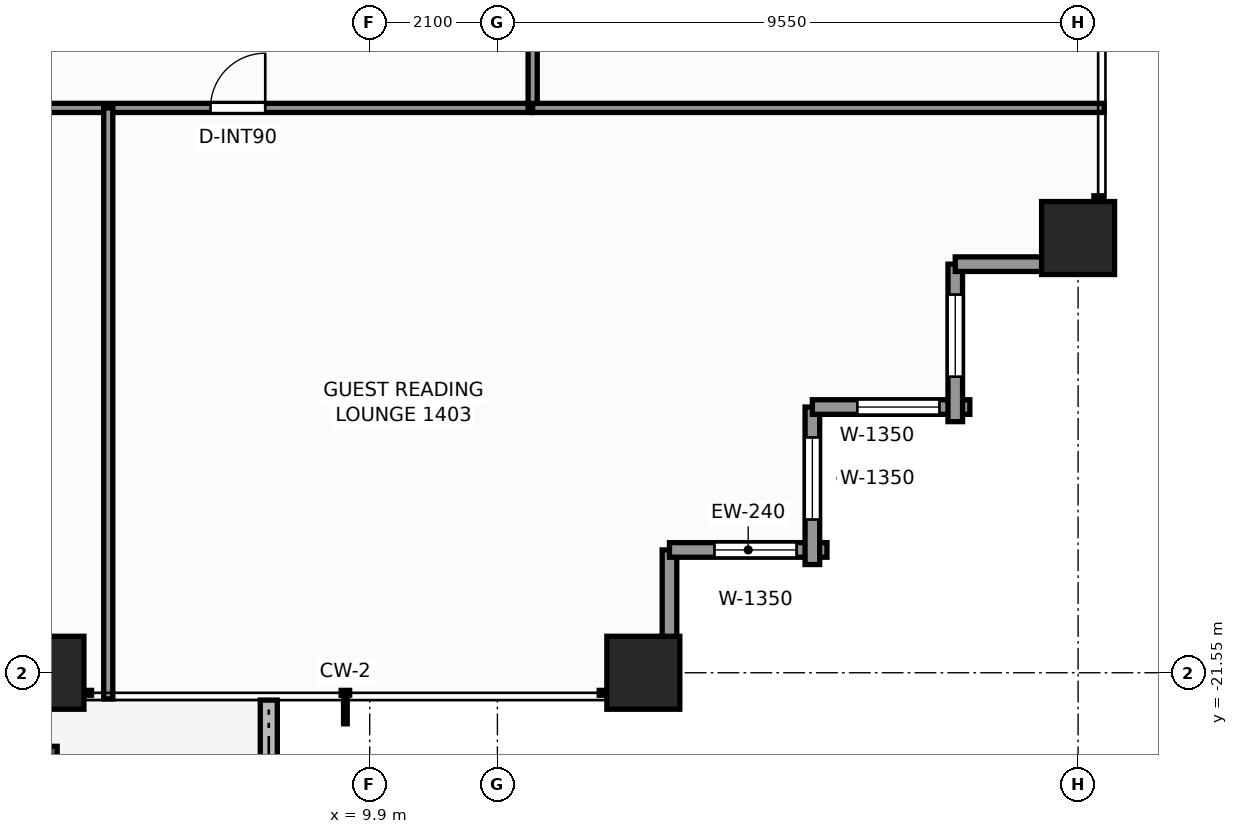
"""IFC4 building model, lengths in metres.
Left out: names, types, materials, properties, quantities, classifications, styles, units other than length and angle.
Written with IfcOpenShell. Run it as: python <this file> out.ifc"""

import sys

from ifc_helpers import new_model, si_unit, direction, frame, frame_2d, origin, origin_2d, place, context, subcontext, project, spatial, rectangle, extrude, element, fill, save


model = new_model("IFC4")
c1 = context("Model", 3, precision=1e-05, world=origin(), true_north=direction((0.0, 1.0)))
c2 = subcontext(c1, "Body", "Model", "MODEL_VIEW")
j1 = project(units=[si_unit("LENGTHUNIT", "METRE"), si_unit("PLANEANGLEUNIT", "RADIAN")], contexts=[c1])
p1 = place(None, origin())
s1 = spatial("IfcSite", under=j1, at=p1, CompositionType="ELEMENT")
p2 = place(p1, origin())
s2 = spatial("IfcBuilding", under=s1, at=p2, CompositionType="ELEMENT")
p3 = place(p2, frame((0.0, 0.0, 50.2)))
s3 = spatial("IfcBuildingStorey", under=s2, at=p3, CompositionType="ELEMENT", Elevation=50.2)
for number, where, z_axis, x_axis in (
    (1, (4.6, -21.55, 0.0), (0.0, 0.0, 1.0), (1.0, 0.0, 0.0)),
    (2, (14.4, -21.55, 0.0), (0.0, 0.0, 1.0), (1.0, 0.0, 0.0)),
    (3, (21.55, -14.4, 0.0), (0.0, 0.0, 1.0), (1.0, 0.0, 0.0)),
):
    element("IfcColumn", number, at=place(p3, frame(where, z_axis=z_axis, x_axis=x_axis)), inside=s3, PredefinedType="COLUMN", context=c2, shape_type="SweptSolid", body=[
        extrude(rectangle(XDim=1.2, YDim=1.2, at=origin_2d()), origin(), (0.0, 0.0, 1.0), 3.3),
    ])
p4 = place(p3, frame((8.24, -23.466, -0.06), z_axis=(0.0, 0.0, 1.0), x_axis=(0.0, 1.0, 0.0)))
e4 = element("IfcWall", 4, at=p4, inside=s3, PredefinedType="PARAPET", context=c2, shape_type="SweptSolid", body=[
    extrude(rectangle(XDim=1.466, YDim=0.28, at=frame_2d((0.733, 0.0))), origin(), (0.0, 0.0, 1.0), 0.42),
])
p5 = place(p3, frame((14.83, -19.53, 0.0), z_axis=(0.0, 0.0, 1.0), x_axis=(0.0, -1.0, 0.0)))
e5 = element("IfcWall", 5, at=p5, inside=s3, PredefinedType="STANDARD", context=c2, shape_type="SweptSolid", body=[
    extrude(rectangle(XDim=2.59, YDim=0.24, at=frame_2d((1.295, 0.0))), origin(), (0.0, 0.0, 1.0), 2.439),
])
p6 = place(p3, frame((17.42, -19.53, 0.0), z_axis=(0.0, 0.0, 1.0), x_axis=(-1.0, 0.0, 0.0)))
e6 = element("IfcWall", 6, at=p6, inside=s3, PredefinedType="STANDARD", context=c2, shape_type="SweptSolid", body=[
    extrude(rectangle(XDim=2.59, YDim=0.24, at=frame_2d((1.295, 0.0))), origin(), (0.0, 0.0, 1.0), 2.439),
])
p7 = place(p6, frame((0.5, 0.0, 0.65)))
e7 = element("IfcOpeningElement", 7, at=p7, cuts=e6, PredefinedType="OPENING", context=c2, shape_type="SweptSolid", body=[
    extrude(rectangle(XDim=1.35, YDim=1.55, at=frame_2d((0.675, 0.775))), frame((0.0, 0.13, 0.0), z_axis=(0.0, -1.0, 0.0), x_axis=(1.0, 0.0, 0.0)), (0.0, 0.0, 1.0), 0.26),
])
p8 = place(p3, frame((17.18, -17.18, 0.0), z_axis=(0.0, 0.0, 1.0), x_axis=(0.0, -1.0, 0.0)))
e8 = element("IfcWall", 8, at=p8, inside=s3, PredefinedType="STANDARD", context=c2, shape_type="SweptSolid", body=[
    extrude(rectangle(XDim=2.59, YDim=0.24, at=frame_2d((1.295, 0.0))), origin(), (0.0, 0.0, 1.0), 2.439),
])
p9 = place(p8, frame((0.5, 0.0, 0.65)))
e9 = element("IfcOpeningElement", 9, at=p9, cuts=e8, PredefinedType="OPENING", context=c2, shape_type="SweptSolid", body=[
    extrude(rectangle(XDim=1.35, YDim=1.55, at=frame_2d((0.675, 0.775))), frame((0.0, 0.13, 0.0), z_axis=(0.0, -1.0, 0.0), x_axis=(1.0, 0.0, 0.0)), (0.0, 0.0, 1.0), 0.26),
])
p10 = place(p3, frame((19.77, -17.18, 0.0), z_axis=(0.0, 0.0, 1.0), x_axis=(-1.0, 0.0, 0.0)))
e10 = element("IfcWall", 10, at=p10, inside=s3, PredefinedType="STANDARD", context=c2, shape_type="SweptSolid", body=[
    extrude(rectangle(XDim=2.59, YDim=0.24, at=frame_2d((1.295, 0.0))), origin(), (0.0, 0.0, 1.0), 2.439),
])
p11 = place(p10, frame((0.5, 0.0, 0.65)))
e11 = element("IfcOpeningElement", 11, at=p11, cuts=e10, PredefinedType="OPENING", context=c2, shape_type="SweptSolid", body=[
    extrude(rectangle(XDim=1.35, YDim=1.55, at=frame_2d((0.675, 0.775))), frame((0.0, 0.13, 0.0), z_axis=(0.0, -1.0, 0.0), x_axis=(1.0, 0.0, 0.0)), (0.0, 0.0, 1.0), 0.26),
])
p12 = place(p3, frame((19.53, -14.83, 0.0), z_axis=(0.0, 0.0, 1.0), x_axis=(0.0, -1.0, 0.0)))
e12 = element("IfcWall", 12, at=p12, inside=s3, PredefinedType="STANDARD", context=c2, shape_type="SweptSolid", body=[
    extrude(rectangle(XDim=2.59, YDim=0.24, at=frame_2d((1.295, 0.0))), origin(), (0.0, 0.0, 1.0), 2.439),
])
p13 = place(p12, frame((0.5, 0.0, 0.65)))
e13 = element("IfcOpeningElement", 13, at=p13, cuts=e12, PredefinedType="OPENING", context=c2, shape_type="SweptSolid", body=[
    extrude(rectangle(XDim=1.35, YDim=1.55, at=frame_2d((0.675, 0.775))), frame((0.0, 0.13, 0.0), z_axis=(0.0, -1.0, 0.0), x_axis=(1.0, 0.0, 0.0)), (0.0, 0.0, 1.0), 0.26),
])
p14 = place(p3, frame((22.12, -14.83, 0.0), z_axis=(0.0, 0.0, 1.0), x_axis=(-1.0, 0.0, 0.0)))
e14 = element("IfcWall", 14, at=p14, inside=s3, PredefinedType="STANDARD", context=c2, shape_type="SweptSolid", body=[
    extrude(rectangle(XDim=2.59, YDim=0.24, at=frame_2d((1.295, 0.0))), origin(), (0.0, 0.0, 1.0), 2.439),
])
p15 = place(p3, frame((-12.26, -12.26, 0.0), z_axis=(0.0, 0.0, 1.0), x_axis=(1.0, 0.0, 0.0)))
e15 = element("IfcWall", 15, at=p15, inside=s3, PredefinedType="PARTITIONING", context=c2, shape_type="SweptSolid", body=[
    extrude(rectangle(XDim=24.84, YDim=0.15, at=frame_2d((12.42, 0.0))), origin(), (0.0, 0.0, 1.0), 2.272),
])
p16 = place(p15, frame((3.203, 0.0, 0.0)))
e16 = element("IfcOpeningElement", 16, at=p16, cuts=e15, PredefinedType="OPENING", context=c2, shape_type="SweptSolid", body=[
    extrude(rectangle(XDim=0.9, YDim=2.06, at=frame_2d((0.45, 1.03))), frame((0.0, 0.085, 0.0), z_axis=(0.0, -1.0, 0.0), x_axis=(1.0, 0.0, 0.0)), (0.0, 0.0, 1.0), 0.17),
])
p17 = place(p15, frame((5.628, 0.0, 0.0)))
e17 = element("IfcOpeningElement", 17, at=p17, cuts=e15, PredefinedType="OPENING", context=c2, shape_type="SweptSolid", body=[
    extrude(rectangle(XDim=0.9, YDim=2.06, at=frame_2d((0.45, 1.03))), frame((0.0, 0.085, 0.0), z_axis=(0.0, -1.0, 0.0), x_axis=(1.0, 0.0, 0.0)), (0.0, 0.0, 1.0), 0.17),
])
p18 = place(p15, frame((8.611, 0.0, 0.0)))
e18 = element("IfcOpeningElement", 18, at=p18, cuts=e15, PredefinedType="OPENING", context=c2, shape_type="SweptSolid", body=[
    extrude(rectangle(XDim=0.95, YDim=2.06, at=frame_2d((0.475, 1.03))), frame((0.0, 0.085, 0.0), z_axis=(0.0, -1.0, 0.0), x_axis=(1.0, 0.0, 0.0)), (0.0, 0.0, 1.0), 0.17),
])
p19 = place(p15, frame((13.84, 0.0, 0.0)))
e19 = element("IfcOpeningElement", 19, at=p19, cuts=e15, PredefinedType="OPENING", context=c2, shape_type="SweptSolid", body=[
    extrude(rectangle(XDim=0.9, YDim=2.06, at=frame_2d((0.45, 1.03))), frame((0.0, 0.085, 0.0), z_axis=(0.0, -1.0, 0.0), x_axis=(1.0, 0.0, 0.0)), (0.0, 0.0, 1.0), 0.17),
])
p20 = place(p15, frame((19.542, 0.0, 0.0)))
e20 = element("IfcOpeningElement", 20, at=p20, cuts=e15, PredefinedType="OPENING", context=c2, shape_type="SweptSolid", body=[
    extrude(rectangle(XDim=0.9, YDim=2.06, at=frame_2d((0.45, 1.03))), frame((0.0, 0.085, 0.0), z_axis=(0.0, -1.0, 0.0), x_axis=(1.0, 0.0, 0.0)), (0.0, 0.0, 1.0), 0.17),
])
p21 = place(p3, frame((12.58, -12.26, 0.0), z_axis=(0.0, 0.0, 1.0), x_axis=(0.0, 1.0, 0.0)))
e21 = element("IfcWall", 21, at=p21, inside=s3, PredefinedType="PARTITIONING", context=c2, shape_type="SweptSolid", body=[
    extrude(rectangle(XDim=24.84, YDim=0.15, at=frame_2d((12.42, 0.0))), origin(), (0.0, 0.0, 1.0), 2.272),
])
p22 = place(p21, frame((2.686, 0.0, 0.0)))
e22 = element("IfcOpeningElement", 22, at=p22, cuts=e21, PredefinedType="OPENING", context=c2, shape_type="SweptSolid", body=[
    extrude(rectangle(XDim=0.9, YDim=2.06, at=frame_2d((0.45, 1.03))), frame((0.0, 0.085, 0.0), z_axis=(0.0, -1.0, 0.0), x_axis=(1.0, 0.0, 0.0)), (0.0, 0.0, 1.0), 0.17),
])
p23 = place(p21, frame((5.021, 0.0, 0.0)))
e23 = element("IfcOpeningElement", 23, at=p23, cuts=e21, PredefinedType="OPENING", context=c2, shape_type="SweptSolid", body=[
    extrude(rectangle(XDim=0.9, YDim=2.06, at=frame_2d((0.45, 1.03))), frame((0.0, 0.085, 0.0), z_axis=(0.0, -1.0, 0.0), x_axis=(1.0, 0.0, 0.0)), (0.0, 0.0, 1.0), 0.17),
])
p24 = place(p21, frame((14.294, 0.0, 0.0)))
e24 = element("IfcOpeningElement", 24, at=p24, cuts=e21, PredefinedType="OPENING", context=c2, shape_type="SweptSolid", body=[
    extrude(rectangle(XDim=0.95, YDim=2.06, at=frame_2d((0.475, 1.03))), frame((0.0, 0.085, 0.0), z_axis=(0.0, -1.0, 0.0), x_axis=(1.0, 0.0, 0.0)), (0.0, 0.0, 1.0), 0.17),
])
p25 = place(p21, frame((19.407, 0.0, 0.0)))
e25 = element("IfcOpeningElement", 25, at=p25, cuts=e21, PredefinedType="OPENING", context=c2, shape_type="SweptSolid", body=[
    extrude(rectangle(XDim=0.95, YDim=2.06, at=frame_2d((0.475, 1.03))), frame((0.0, 0.085, 0.0), z_axis=(0.0, -1.0, 0.0), x_axis=(1.0, 0.0, 0.0)), (0.0, 0.0, 1.0), 0.17),
])
p26 = place(p3, frame((12.58, -12.26, 0.0), z_axis=(0.0, 0.0, 1.0), x_axis=(1.0, 0.0, 0.0)))
e26 = element("IfcWall", 26, at=p26, inside=s3, PredefinedType="PARTITIONING", context=c2, shape_type="SweptSolid", body=[
    extrude(rectangle(XDim=9.4, YDim=0.15, at=frame_2d((4.7, 0.0))), origin(), (0.0, 0.0, 1.0), 2.272),
])
p27 = place(p3, frame((5.6, -21.98, 0.0), z_axis=(0.0, 0.0, 1.0), x_axis=(0.0, 1.0, 0.0)))
e27 = element("IfcWall", 27, at=p27, inside=s3, PredefinedType="PARTITIONING", context=c2, shape_type="SweptSolid", body=[
    extrude(rectangle(XDim=9.72, YDim=0.15, at=frame_2d((4.86, 0.0))), origin(), (0.0, 0.0, 1.0), 2.429),
])
p28 = place(p7, origin())
e28 = element("IfcWindow", 28, at=p28, inside=s3, PartitioningType="SINGLE_PANEL", PredefinedType="WINDOW", context=c2, shape_type="SweptSolid", body=[
    extrude(rectangle(XDim=1.35, YDim=1.55, at=frame_2d((0.675, 0.775))), frame((0.0, 0.03, 0.0), z_axis=(0.0, -1.0, 0.0), x_axis=(1.0, 0.0, 0.0)), (0.0, 0.0, 1.0), 0.06),
])
fill(e7, e28)
p29 = place(p9, origin())
e29 = element("IfcWindow", 29, at=p29, inside=s3, PartitioningType="SINGLE_PANEL", PredefinedType="WINDOW", context=c2, shape_type="SweptSolid", body=[
    extrude(rectangle(XDim=1.35, YDim=1.55, at=frame_2d((0.675, 0.775))), frame((0.0, 0.03, 0.0), z_axis=(0.0, -1.0, 0.0), x_axis=(1.0, 0.0, 0.0)), (0.0, 0.0, 1.0), 0.06),
])
fill(e9, e29)
p30 = place(p11, origin())
e30 = element("IfcWindow", 30, at=p30, inside=s3, PartitioningType="SINGLE_PANEL", PredefinedType="WINDOW", context=c2, shape_type="SweptSolid", body=[
    extrude(rectangle(XDim=1.35, YDim=1.55, at=frame_2d((0.675, 0.775))), frame((0.0, 0.03, 0.0), z_axis=(0.0, -1.0, 0.0), x_axis=(1.0, 0.0, 0.0)), (0.0, 0.0, 1.0), 0.06),
])
fill(e11, e30)
p31 = place(p13, origin())
e31 = element("IfcWindow", 31, at=p31, inside=s3, PartitioningType="SINGLE_PANEL", PredefinedType="WINDOW", context=c2, shape_type="SweptSolid", body=[
    extrude(rectangle(XDim=1.35, YDim=1.55, at=frame_2d((0.675, 0.775))), frame((0.0, 0.03, 0.0), z_axis=(0.0, -1.0, 0.0), x_axis=(1.0, 0.0, 0.0)), (0.0, 0.0, 1.0), 0.06),
])
fill(e13, e31)
p32 = place(p20, origin())
e32 = element("IfcDoor", 32, at=p32, inside=s3, OperationType="SINGLE_SWING_RIGHT", PredefinedType="DOOR", context=c2, shape_type="SweptSolid", body=[
    extrude(rectangle(XDim=0.9, YDim=2.06, at=frame_2d((0.45, 1.03))), frame((0.0, 0.025, 0.0), z_axis=(0.0, -1.0, 0.0), x_axis=(1.0, 0.0, 0.0)), (0.0, 0.0, 1.0), 0.05),
])
fill(e20, e32)
save(model, sys.argv[1])
